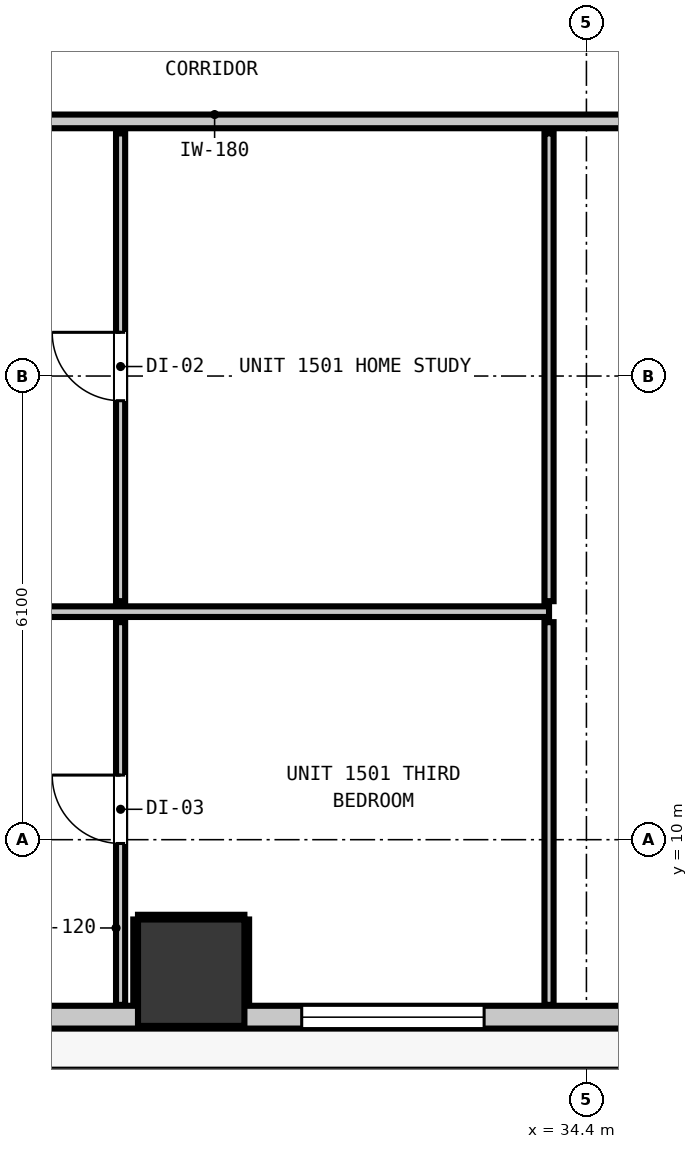
"""IFC4 building model, lengths in metres.
Left out: names, types, materials, properties, quantities, classifications, styles, units other than length and angle.
Written with IfcOpenShell. Run it as: python <this file> out.ifc"""

import sys

from ifc_helpers import new_model, si_unit, direction, frame, frame_2d, origin, origin_2d, place, context, subcontext, project, spatial, rectangle, extrude, element, fill, save


model = new_model("IFC4")
c1 = context("Model", 3, precision=1e-05, world=origin(), true_north=direction((0.0, 1.0)))
c2 = subcontext(c1, "Body", "Model", "MODEL_VIEW")
j1 = project(units=[si_unit("LENGTHUNIT", "METRE"), si_unit("PLANEANGLEUNIT", "RADIAN")], contexts=[c1])
p1 = place(None, origin())
s1 = spatial("IfcSite", under=j1, at=p1, CompositionType="ELEMENT")
p2 = place(p1, origin())
s2 = spatial("IfcBuilding", under=s1, at=p2, CompositionType="ELEMENT")
p3 = place(p2, frame((0.0, 0.0, 55.2)))
s3 = spatial("IfcBuildingStorey", under=s2, at=p3, CompositionType="ELEMENT", Elevation=55.2)
p4 = place(p3, frame((29.2, 8.25, 0.0), z_axis=(0.0, 0.0, 1.0), x_axis=(1.0, 0.0, 0.0)))
e1 = element("IfcColumn", 1, at=p4, inside=s3, PredefinedType="COLUMN", context=c2, shape_type="SweptSolid", body=[
    extrude(rectangle(XDim=1.4, YDim=1.4, at=origin_2d()), origin(), (0.0, 0.0, 1.0), 3.32),
])
p5 = place(p3, frame((47.835, 7.665, 0.0), z_axis=(0.0, 0.0, 1.0), x_axis=(-1.0, 0.0, 0.0)))
e2 = element("IfcWall", 2, at=p5, inside=s3, PredefinedType="STANDARD", context=c2, shape_type="SweptSolid", body=[
    extrude(rectangle(XDim=37.47, YDim=0.3, at=frame_2d((18.735, 0.0))), origin(), (0.0, 0.0, 1.0), 3.06),
])
p6 = place(p5, frame((0.901, 0.0, 0.0)))
e3 = element("IfcOpeningElement", 3, at=p6, cuts=e2, PredefinedType="OPENING", context=c2, shape_type="SweptSolid", body=[
    extrude(rectangle(XDim=1.0, YDim=2.15, at=frame_2d((0.5, 1.075))), frame((0.0, 0.16, 0.0), z_axis=(0.0, -1.0, 0.0), x_axis=(1.0, 0.0, 0.0)), (0.0, 0.0, 1.0), 0.32),
])
p7 = place(p5, frame((29.535, 0.0, 0.85)))
e4 = element("IfcOpeningElement", 4, at=p7, cuts=e2, PredefinedType="OPENING", context=c2, shape_type="SweptSolid", body=[
    extrude(rectangle(XDim=2.4, YDim=1.95, at=frame_2d((1.2, 0.975))), frame((0.0, 0.16, 0.0), z_axis=(0.0, -1.0, 0.0), x_axis=(1.0, 0.0, 0.0)), (0.0, 0.0, 1.0), 0.32),
])
p8 = place(p5, frame((36.622, 0.0, 0.85)))
e5 = element("IfcOpeningElement", 5, at=p8, cuts=e2, PredefinedType="OPENING", context=c2, shape_type="SweptSolid", body=[
    extrude(rectangle(XDim=0.58, YDim=1.5, at=frame_2d((0.29, 0.75))), frame((0.0, 0.16, 0.0), z_axis=(0.0, -1.0, 0.0), x_axis=(1.0, 0.0, 0.0)), (0.0, 0.0, 1.0), 0.32),
])
p9 = place(p5, frame((21.309, 0.0, 0.85)))
e6 = element("IfcOpeningElement", 6, at=p9, cuts=e2, PredefinedType="OPENING", context=c2, shape_type="SweptSolid", body=[
    extrude(rectangle(XDim=2.4, YDim=1.95, at=frame_2d((1.2, 0.975))), frame((0.0, 0.16, 0.0), z_axis=(0.0, -1.0, 0.0), x_axis=(1.0, 0.0, 0.0)), (0.0, 0.0, 1.0), 0.32),
])
p10 = place(p5, frame((14.781, 0.0, 0.85)))
e7 = element("IfcOpeningElement", 7, at=p10, cuts=e2, PredefinedType="OPENING", context=c2, shape_type="SweptSolid", body=[
    extrude(rectangle(XDim=2.4, YDim=1.95, at=frame_2d((1.2, 0.975))), frame((0.0, 0.16, 0.0), z_axis=(0.0, -1.0, 0.0), x_axis=(1.0, 0.0, 0.0)), (0.0, 0.0, 1.0), 0.32),
])
p11 = place(p5, frame((5.168, 0.0, 0.85)))
e8 = element("IfcOpeningElement", 8, at=p11, cuts=e2, PredefinedType="OPENING", context=c2, shape_type="SweptSolid", body=[
    extrude(rectangle(XDim=2.4, YDim=1.95, at=frame_2d((1.2, 0.975))), frame((0.0, 0.16, 0.0), z_axis=(0.0, -1.0, 0.0), x_axis=(1.0, 0.0, 0.0)), (0.0, 0.0, 1.0), 0.32),
])
p12 = place(p3, frame((8.027, 19.45, 0.0), z_axis=(0.0, 0.0, 1.0), x_axis=(1.0, 0.0, 0.0)))
e9 = element("IfcWall", 9, at=p12, inside=s3, PredefinedType="PARTITIONING", context=c2, shape_type="SweptSolid", body=[
    extrude(rectangle(XDim=42.146, YDim=0.18, at=frame_2d((21.073, 0.0))), origin(), (0.0, 0.0, 1.0), 3.06),
])
p13 = place(p12, frame((8.409, 0.0, 0.0)))
e10 = element("IfcOpeningElement", 10, at=p13, cuts=e9, PredefinedType="OPENING", context=c2, shape_type="SweptSolid", body=[
    extrude(rectangle(XDim=1.0, YDim=2.15, at=frame_2d((0.5, 1.075))), frame((0.0, 0.1, 0.0), z_axis=(0.0, -1.0, 0.0), x_axis=(1.0, 0.0, 0.0)), (0.0, 0.0, 1.0), 0.2),
])
p14 = place(p12, frame((33.553, 0.0, 0.0)))
e11 = element("IfcOpeningElement", 11, at=p14, cuts=e9, PredefinedType="OPENING", context=c2, shape_type="SweptSolid", body=[
    extrude(rectangle(XDim=0.9, YDim=2.1, at=frame_2d((0.45, 1.05))), frame((0.0, 0.1, 0.0), z_axis=(0.0, -1.0, 0.0), x_axis=(1.0, 0.0, 0.0)), (0.0, 0.0, 1.0), 0.2),
])
p15 = place(p3, frame((8.027, 13.0, 0.0), z_axis=(0.0, 0.0, 1.0), x_axis=(1.0, 0.0, 0.0)))
e12 = element("IfcWall", 12, at=p15, inside=s3, PredefinedType="PARTITIONING", context=c2, shape_type="SweptSolid", body=[
    extrude(rectangle(XDim=25.881, YDim=0.14, at=frame_2d((12.94, 0.0))), origin(), (0.0, 0.0, 1.0), 3.06),
])
p16 = place(p15, frame((8.459, 0.0, 0.0)))
e13 = element("IfcOpeningElement", 13, at=p16, cuts=e12, PredefinedType="OPENING", context=c2, shape_type="SweptSolid", body=[
    extrude(rectangle(XDim=0.9, YDim=2.1, at=frame_2d((0.45, 1.05))), frame((0.0, 0.08, 0.0), z_axis=(0.0, -1.0, 0.0), x_axis=(1.0, 0.0, 0.0)), (0.0, 0.0, 1.0), 0.16),
])
p17 = place(p3, frame((28.271, 7.827, 0.0), z_axis=(0.0, 0.0, 1.0), x_axis=(0.0, 1.0, 0.0)))
e14 = element("IfcWall", 14, at=p17, inside=s3, PredefinedType="PARTITIONING", context=c2, shape_type="SweptSolid", body=[
    extrude(rectangle(XDim=5.035, YDim=0.12, at=frame_2d((2.518, 0.0))), origin(), (0.0, 0.0, 1.0), 3.06),
])
p18 = place(p17, frame((2.123, 0.0, 0.0)))
e15 = element("IfcOpeningElement", 15, at=p18, cuts=e14, PredefinedType="OPENING", context=c2, shape_type="SweptSolid", body=[
    extrude(rectangle(XDim=0.9, YDim=2.1, at=frame_2d((0.45, 1.05))), frame((0.0, 0.07, 0.0), z_axis=(0.0, -1.0, 0.0), x_axis=(1.0, 0.0, 0.0)), (0.0, 0.0, 1.0), 0.14),
])
p19 = place(p3, frame((28.271, 13.138, 0.0), z_axis=(0.0, 0.0, 1.0), x_axis=(0.0, 1.0, 0.0)))
e16 = element("IfcWall", 16, at=p19, inside=s3, PredefinedType="PARTITIONING", context=c2, shape_type="SweptSolid", body=[
    extrude(rectangle(XDim=6.154, YDim=0.12, at=frame_2d((3.077, 0.0))), origin(), (0.0, 0.0, 1.0), 3.06),
])
p20 = place(p19, frame((2.637, 0.0, 0.0)))
e17 = element("IfcOpeningElement", 17, at=p20, cuts=e16, PredefinedType="OPENING", context=c2, shape_type="SweptSolid", body=[
    extrude(rectangle(XDim=0.9, YDim=2.1, at=frame_2d((0.45, 1.05))), frame((0.0, 0.07, 0.0), z_axis=(0.0, -1.0, 0.0), x_axis=(1.0, 0.0, 0.0)), (0.0, 0.0, 1.0), 0.14),
])
p21 = place(p3, frame((33.908, 7.827, 0.0), z_axis=(0.0, 0.0, 1.0), x_axis=(0.0, 1.0, 0.0)))
e18 = element("IfcWall", 18, at=p21, inside=s3, PredefinedType="PARTITIONING", context=c2, shape_type="SweptSolid", body=[
    extrude(rectangle(XDim=5.035, YDim=0.12, at=frame_2d((2.518, 0.0))), origin(), (0.0, 0.0, 1.0), 3.06),
])
p22 = place(p3, frame((33.908, 13.138, 0.0), z_axis=(0.0, 0.0, 1.0), x_axis=(0.0, 1.0, 0.0)))
e19 = element("IfcWall", 19, at=p22, inside=s3, PredefinedType="PARTITIONING", context=c2, shape_type="SweptSolid", body=[
    extrude(rectangle(XDim=6.154, YDim=0.12, at=frame_2d((3.077, 0.0))), origin(), (0.0, 0.0, 1.0), 3.06),
])
p23 = place(p3, frame((28.5, 8.982, 0.0), z_axis=(0.0, 0.0, 1.0), x_axis=(1.0, 0.0, 0.0)))
e20 = element("IfcWall", 20, at=p23, inside=s3, PredefinedType="PARTITIONING", context=c2, shape_type="SweptSolid", body=[
    extrude(rectangle(XDim=1.4, YDim=0.06, at=frame_2d((0.7, 0.0))), origin(), (0.0, 0.0, 1.0), 1.45),
])
for number, where, z_axis, x_axis in (
    (21, (28.468, 7.83, 0.0), (0.0, 0.0, 1.0), (0.0, 1.0, 0.0)),
    (22, (29.932, 7.83, 0.0), (0.0, 0.0, 1.0), (0.0, 1.0, 0.0)),
):
    element("IfcWall", number, at=place(p3, frame(where, z_axis=z_axis, x_axis=x_axis)), inside=s3, PredefinedType="PARTITIONING", context=c2, shape_type="SweptSolid", body=[
        extrude(rectangle(XDim=1.12, YDim=0.06, at=frame_2d((0.56, 0.0))), origin(), (0.0, 0.0, 1.0), 1.45),
    ])
p24 = place(p10, origin())
e23 = element("IfcWindow", 23, at=p24, inside=s3, PartitioningType="SINGLE_PANEL", PredefinedType="WINDOW", context=c2, shape_type="SweptSolid", body=[
    extrude(rectangle(XDim=2.4, YDim=1.95, at=frame_2d((1.2, 0.975))), frame((0.0, 0.03, 0.0), z_axis=(0.0, -1.0, 0.0), x_axis=(1.0, 0.0, 0.0)), (0.0, 0.0, 1.0), 0.06),
])
fill(e7, e23)
p25 = place(p20, origin())
e24 = element("IfcDoor", 24, at=p25, inside=s3, OperationType="SINGLE_SWING_RIGHT", PredefinedType="DOOR", context=c2, shape_type="SweptSolid", body=[
    extrude(rectangle(XDim=0.9, YDim=2.1, at=frame_2d((0.45, 1.05))), frame((0.0, 0.025, 0.0), z_axis=(0.0, -1.0, 0.0), x_axis=(1.0, 0.0, 0.0)), (0.0, 0.0, 1.0), 0.05),
])
fill(e17, e24)
p26 = place(p18, origin())
e25 = element("IfcDoor", 25, at=p26, inside=s3, OperationType="SINGLE_SWING_RIGHT", PredefinedType="DOOR", context=c2, shape_type="SweptSolid", body=[
    extrude(rectangle(XDim=0.9, YDim=2.1, at=frame_2d((0.45, 1.05))), frame((0.0, 0.025, 0.0), z_axis=(0.0, -1.0, 0.0), x_axis=(1.0, 0.0, 0.0)), (0.0, 0.0, 1.0), 0.05),
])
fill(e15, e25)
save(model, sys.argv[1])
